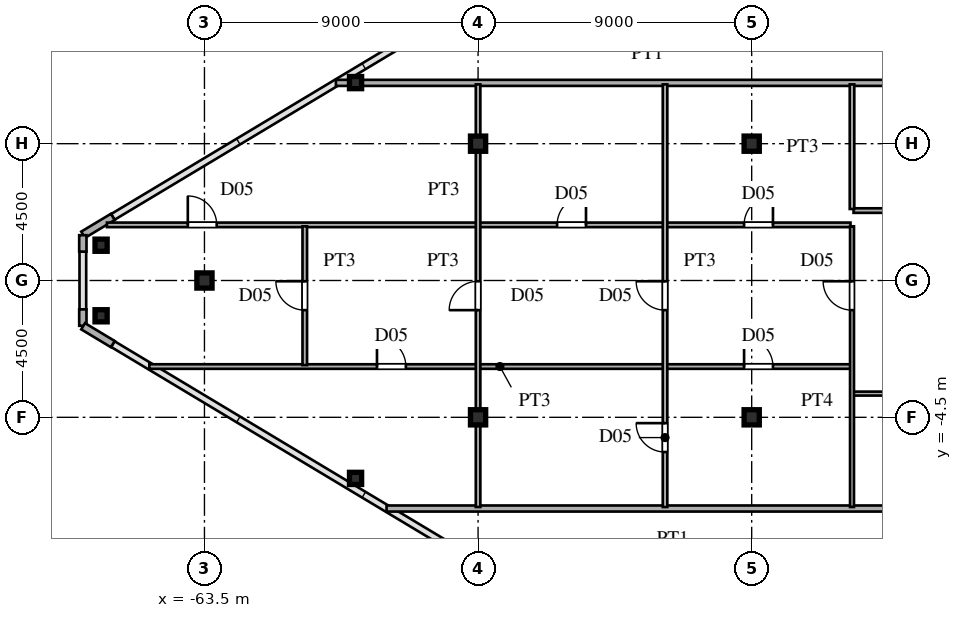
"""IFC4 building model, lengths in metres.
Left out: names, types, materials, properties, quantities, classifications, styles, units other than length and angle.
Written with IfcOpenShell. Run it as: python <this file> out.ifc"""

import sys

from ifc_helpers import new_model, si_unit, direction, frame, frame_2d, origin, origin_2d, place, context, subcontext, project, spatial, rectangle, hollow_rectangle, i_section, extrude, source, transform, mapped, element, fill, save


model = new_model("IFC4")
c1 = context("Model", 3, precision=1e-05, world=origin(), true_north=direction((0.0, 1.0)))
c2 = subcontext(c1, "Body", "Model", "MODEL_VIEW")
j1 = project(units=[si_unit("LENGTHUNIT", "METRE"), si_unit("PLANEANGLEUNIT", "RADIAN")], contexts=[c1])
p1 = place(None, origin())
s1 = spatial("IfcSite", under=j1, at=p1, CompositionType="ELEMENT")
p2 = place(p1, origin())
s2 = spatial("IfcBuilding", under=s1, at=p2, CompositionType="ELEMENT")
p3 = place(p2, frame((0.0, 0.0, 229.8)))
s3 = spatial("IfcBuildingStorey", under=s2, at=p3, CompositionType="ELEMENT", Elevation=229.8)
m1 = source(origin(), c2, "Body", "SweptSolid", [
    extrude(i_section(OverallWidth=0.5, OverallDepth=0.5, WebThickness=0.02, FlangeThickness=0.032, at=origin_2d()), origin(), (0.0, 0.0, 1.0), 4.8),
])
for number, where, z_axis, x_axis in (
    (1, (-45.5, -4.5, 0.0), (0.0, 0.0, 1.0), (1.0, 0.0, 0.0)),
    (2, (-45.5, 4.5, 0.0), (0.0, 0.0, 1.0), (1.0, 0.0, 0.0)),
    (3, (-54.5, -4.5, 0.0), (0.0, 0.0, 1.0), (1.0, 0.0, 0.0)),
    (4, (-54.5, 4.5, 0.0), (0.0, 0.0, 1.0), (1.0, 0.0, 0.0)),
    (5, (-63.5, 0.0, 0.0), (0.0, 0.0, 1.0), (1.0, 0.0, 0.0)),
):
    element("IfcColumn", number, at=place(p3, frame(where, z_axis=z_axis, x_axis=x_axis)), inside=s3, PredefinedType="COLUMN", context=c2, shape_type="MappedRepresentation", body=[
        mapped(m1, transform((0.0, 0.0, 0.0), scale=1.0)),
    ])
m2 = source(origin(), c2, "Body", "SweptSolid", [
    extrude(hollow_rectangle(XDim=0.4, YDim=0.4, WallThickness=0.016, at=origin_2d()), origin(), (0.0, 0.0, 1.0), 4.8),
])
for number, where, z_axis, x_axis in (
    (6, (-66.9, 1.16, 0.0), (0.0, 0.0, 1.0), (1.0, 0.0, 0.0)),
    (7, (-66.9, -1.16, 0.0), (0.0, 0.0, 1.0), (1.0, 0.0, 0.0)),
    (8, (-58.53, -6.509, 0.0), (0.0, 0.0, 1.0), (1.0, 0.0, 0.0)),
    (9, (-58.53, 6.509, 0.0), (0.0, 0.0, 1.0), (1.0, 0.0, 0.0)),
):
    element("IfcColumn", number, at=place(p3, frame(where, z_axis=z_axis, x_axis=x_axis)), inside=s3, PredefinedType="COLUMN", context=c2, shape_type="MappedRepresentation", body=[
        mapped(m2, transform((0.0, 0.0, 0.0), scale=1.0)),
    ])
p4 = place(p3, frame((-66.514, 2.092, 0.0), z_axis=(0.0, 0.0, 1.0), x_axis=(-0.85743623509, -0.514590228002, 0.0)))
e10 = element("IfcWall", 10, at=p4, inside=s3, PredefinedType="SOLIDWALL", context=c2, shape_type="SweptSolid", body=[
    extrude(rectangle(XDim=1.14, YDim=0.24, at=frame_2d((0.57, 0.0))), origin(), (0.0, 0.0, 1.0), 4.54),
])
for number, where, z_axis, x_axis in (
    (11, (-67.5, 1.49, 0.0), (0.0, 0.0, 1.0), (0.0, -1.0, 0.0)),
    (12, (-67.5, -0.95, 0.0), (0.0, 0.0, 1.0), (0.0, -1.0, 0.0)),
):
    element("IfcWall", number, at=place(p3, frame(where, z_axis=z_axis, x_axis=x_axis)), inside=s3, PredefinedType="SOLIDWALL", context=c2, shape_type="SweptSolid", body=[
        extrude(rectangle(XDim=0.54, YDim=0.24, at=frame_2d((0.27, 0.0))), origin(), (0.0, 0.0, 1.0), 4.54),
    ])
p5 = place(p3, frame((-67.491, -1.505, 0.0), z_axis=(0.0, 0.0, 1.0), x_axis=(0.85743623509, -0.514590228002, 0.0)))
e13 = element("IfcWall", 13, at=p5, inside=s3, PredefinedType="SOLIDWALL", context=c2, shape_type="SweptSolid", body=[
    extrude(rectangle(XDim=1.14, YDim=0.24, at=frame_2d((0.57, 0.0))), origin(), (0.0, 0.0, 1.0), 4.54),
])
p6 = place(p3, frame((-57.51, -7.5, 0.0), z_axis=(0.0, 0.0, 1.0), x_axis=(1.0, 0.0, 0.0)))
e14 = element("IfcWall", 14, at=p6, inside=s3, PredefinedType="PARTITIONING", context=c2, shape_type="SweptSolid", body=[
    extrude(rectangle(XDim=18.83, YDim=0.2, at=frame_2d((9.415, 0.0))), origin(), (0.0, 0.0, 1.0), 4.54),
])
p7 = place(p3, frame((-42.15, -3.72, 0.0), z_axis=(0.0, 0.0, 1.0), x_axis=(1.0, 0.0, 0.0)))
e15 = element("IfcWall", 15, at=p7, inside=s3, PredefinedType="PARTITIONING", context=c2, shape_type="SweptSolid", body=[
    extrude(rectangle(XDim=3.5, YDim=0.13, at=frame_2d((1.75, 0.0))), origin(), (0.0, 0.0, 1.0), 4.54),
])
p8 = place(p7, frame((1.31, 0.0, 0.0)))
e16 = element("IfcOpeningElement", 16, at=p8, cuts=e15, PredefinedType="OPENING", context=c2, shape_type="SweptSolid", body=[
    extrude(rectangle(XDim=0.88, YDim=2.1, at=frame_2d((0.44, 1.05))), frame((0.0, 0.075, 0.0), z_axis=(0.0, -1.0, 0.0), x_axis=(1.0, 0.0, 0.0)), (0.0, 0.0, 1.0), 0.15),
])
p9 = place(p3, frame((-65.313, -2.83, 0.0), z_axis=(0.0, 0.0, 1.0), x_axis=(1.0, 0.0, 0.0)))
e17 = element("IfcWall", 17, at=p9, inside=s3, PredefinedType="PARTITIONING", context=c2, shape_type="SweptSolid", body=[
    extrude(rectangle(XDim=23.063, YDim=0.15, at=frame_2d((11.531, 0.0))), origin(), (0.0, 0.0, 1.0), 4.54),
])
p10 = place(p9, frame((19.563, 0.0, 0.0)))
e18 = element("IfcOpeningElement", 18, at=p10, cuts=e17, PredefinedType="OPENING", context=c2, shape_type="SweptSolid", body=[
    extrude(rectangle(XDim=0.95, YDim=2.15, at=frame_2d((0.475, 1.075))), frame((0.0, 0.085, 0.0), z_axis=(0.0, -1.0, 0.0), x_axis=(1.0, 0.0, 0.0)), (0.0, 0.0, 1.0), 0.17),
])
p11 = place(p9, frame((7.488, 0.0, 0.0)))
e19 = element("IfcOpeningElement", 19, at=p11, cuts=e17, PredefinedType="OPENING", context=c2, shape_type="SweptSolid", body=[
    extrude(rectangle(XDim=0.95, YDim=2.15, at=frame_2d((0.475, 1.075))), frame((0.0, 0.085, 0.0), z_axis=(0.0, -1.0, 0.0), x_axis=(1.0, 0.0, 0.0)), (0.0, 0.0, 1.0), 0.17),
])
p12 = place(p3, frame((-66.707, 1.83, 0.0), z_axis=(0.0, 0.0, 1.0), x_axis=(1.0, 0.0, 0.0)))
e20 = element("IfcWall", 20, at=p12, inside=s3, PredefinedType="PARTITIONING", context=c2, shape_type="SweptSolid", body=[
    extrude(rectangle(XDim=24.457, YDim=0.15, at=frame_2d((12.229, 0.0))), origin(), (0.0, 0.0, 1.0), 4.54),
])
p13 = place(p12, frame((20.957, 0.0, 0.0)))
e21 = element("IfcOpeningElement", 21, at=p13, cuts=e20, PredefinedType="OPENING", context=c2, shape_type="SweptSolid", body=[
    extrude(rectangle(XDim=0.95, YDim=2.15, at=frame_2d((0.475, 1.075))), frame((0.0, 0.085, 0.0), z_axis=(0.0, -1.0, 0.0), x_axis=(1.0, 0.0, 0.0)), (0.0, 0.0, 1.0), 0.17),
])
p14 = place(p12, frame((2.66, 0.0, 0.0)))
e22 = element("IfcOpeningElement", 22, at=p14, cuts=e20, PredefinedType="OPENING", context=c2, shape_type="SweptSolid", body=[
    extrude(rectangle(XDim=0.95, YDim=2.15, at=frame_2d((0.475, 1.075))), frame((0.0, 0.085, 0.0), z_axis=(0.0, -1.0, 0.0), x_axis=(1.0, 0.0, 0.0)), (0.0, 0.0, 1.0), 0.17),
])
p15 = place(p12, frame((14.807, 0.0, 0.0)))
e23 = element("IfcOpeningElement", 23, at=p15, cuts=e20, PredefinedType="OPENING", context=c2, shape_type="SweptSolid", body=[
    extrude(rectangle(XDim=0.95, YDim=2.15, at=frame_2d((0.475, 1.075))), frame((0.0, 0.085, 0.0), z_axis=(0.0, -1.0, 0.0), x_axis=(1.0, 0.0, 0.0)), (0.0, 0.0, 1.0), 0.17),
])
p16 = place(p3, frame((-42.15, 2.3, 0.0), z_axis=(0.0, 0.0, 1.0), x_axis=(1.0, 0.0, 0.0)))
e24 = element("IfcWall", 24, at=p16, inside=s3, PredefinedType="PARTITIONING", context=c2, shape_type="SweptSolid", body=[
    extrude(rectangle(XDim=3.5, YDim=0.15, at=frame_2d((1.75, 0.0))), origin(), (0.0, 0.0, 1.0), 4.54),
])
p17 = place(p16, frame((1.275, 0.0, 0.0)))
e25 = element("IfcOpeningElement", 25, at=p17, cuts=e24, PredefinedType="OPENING", context=c2, shape_type="SweptSolid", body=[
    extrude(rectangle(XDim=0.95, YDim=2.15, at=frame_2d((0.475, 1.075))), frame((0.0, 0.085, 0.0), z_axis=(0.0, -1.0, 0.0), x_axis=(1.0, 0.0, 0.0)), (0.0, 0.0, 1.0), 0.17),
])
p18 = place(p3, frame((-59.176, 6.5, 0.0), z_axis=(0.0, 0.0, 1.0), x_axis=(1.0, 0.0, 0.0)))
e26 = element("IfcWall", 26, at=p18, inside=s3, PredefinedType="PARTITIONING", context=c2, shape_type="SweptSolid", body=[
    extrude(rectangle(XDim=20.496, YDim=0.2, at=frame_2d((10.248, 0.0))), origin(), (0.0, 0.0, 1.0), 4.54),
])
p19 = place(p3, frame((-60.2, -2.783, 0.0), z_axis=(0.0, 0.0, 1.0), x_axis=(0.0, 1.0, 0.0)))
e27 = element("IfcWall", 27, at=p19, inside=s3, PredefinedType="PARTITIONING", context=c2, shape_type="SweptSolid", body=[
    extrude(rectangle(XDim=4.566, YDim=0.15, at=frame_2d((2.283, 0.0))), origin(), (0.0, 0.0, 1.0), 4.54),
])
p20 = place(p19, frame((1.808, 0.0, 0.0)))
e28 = element("IfcOpeningElement", 28, at=p20, cuts=e27, PredefinedType="OPENING", context=c2, shape_type="SweptSolid", body=[
    extrude(rectangle(XDim=0.95, YDim=2.15, at=frame_2d((0.475, 1.075))), frame((0.0, 0.085, 0.0), z_axis=(0.0, -1.0, 0.0), x_axis=(1.0, 0.0, 0.0)), (0.0, 0.0, 1.0), 0.17),
])
p21 = place(p3, frame((-54.5, -7.45, 0.0), z_axis=(0.0, 0.0, 1.0), x_axis=(0.0, 1.0, 0.0)))
e29 = element("IfcWall", 29, at=p21, inside=s3, PredefinedType="PARTITIONING", context=c2, shape_type="SweptSolid", body=[
    extrude(rectangle(XDim=13.9, YDim=0.15, at=frame_2d((6.95, 0.0))), origin(), (0.0, 0.0, 1.0), 3.94),
])
p22 = place(p21, frame((6.475, 0.0, 0.0)))
e30 = element("IfcOpeningElement", 30, at=p22, cuts=e29, PredefinedType="OPENING", context=c2, shape_type="SweptSolid", body=[
    extrude(rectangle(XDim=0.95, YDim=2.15, at=frame_2d((0.475, 1.075))), frame((0.0, 0.085, 0.0), z_axis=(0.0, -1.0, 0.0), x_axis=(1.0, 0.0, 0.0)), (0.0, 0.0, 1.0), 0.17),
])
p23 = place(p3, frame((-48.35, -7.45, 0.0), z_axis=(0.0, 0.0, 1.0), x_axis=(0.0, 1.0, 0.0)))
e31 = element("IfcWall", 31, at=p23, inside=s3, PredefinedType="PARTITIONING", context=c2, shape_type="SweptSolid", body=[
    extrude(rectangle(XDim=13.9, YDim=0.15, at=frame_2d((6.95, 0.0))), origin(), (0.0, 0.0, 1.0), 4.54),
])
p24 = place(p23, frame((6.475, 0.0, 0.0)))
e32 = element("IfcOpeningElement", 32, at=p24, cuts=e31, PredefinedType="OPENING", context=c2, shape_type="SweptSolid", body=[
    extrude(rectangle(XDim=0.95, YDim=2.15, at=frame_2d((0.475, 1.075))), frame((0.0, 0.085, 0.0), z_axis=(0.0, -1.0, 0.0), x_axis=(1.0, 0.0, 0.0)), (0.0, 0.0, 1.0), 0.17),
])
p25 = place(p23, frame((1.808, 0.0, 0.0)))
e33 = element("IfcOpeningElement", 33, at=p25, cuts=e31, PredefinedType="OPENING", context=c2, shape_type="SweptSolid", body=[
    extrude(rectangle(XDim=0.95, YDim=2.15, at=frame_2d((0.475, 1.075))), frame((0.0, 0.085, 0.0), z_axis=(0.0, -1.0, 0.0), x_axis=(1.0, 0.0, 0.0)), (0.0, 0.0, 1.0), 0.17),
])
p26 = place(p3, frame((-42.2, -7.45, 0.0), z_axis=(0.0, 0.0, 1.0), x_axis=(0.0, 1.0, 0.0)))
e34 = element("IfcWall", 34, at=p26, inside=s3, PredefinedType="PARTITIONING", context=c2, shape_type="SweptSolid", body=[
    extrude(rectangle(XDim=9.233, YDim=0.13, at=frame_2d((4.616, 0.0))), origin(), (0.0, 0.0, 1.0), 4.54),
])
p27 = place(p26, frame((6.475, 0.0, 0.0)))
e35 = element("IfcOpeningElement", 35, at=p27, cuts=e34, PredefinedType="OPENING", context=c2, shape_type="SweptSolid", body=[
    extrude(rectangle(XDim=0.95, YDim=2.15, at=frame_2d((0.475, 1.075))), frame((0.0, 0.075, 0.0), z_axis=(0.0, -1.0, 0.0), x_axis=(1.0, 0.0, 0.0)), (0.0, 0.0, 1.0), 0.15),
])
p28 = place(p3, frame((-42.2, 2.352, 0.0), z_axis=(0.0, 0.0, 1.0), x_axis=(0.0, 1.0, 0.0)))
e36 = element("IfcWall", 36, at=p28, inside=s3, PredefinedType="PARTITIONING", context=c2, shape_type="SweptSolid", body=[
    extrude(rectangle(XDim=4.098, YDim=0.15, at=frame_2d((2.049, 0.0))), origin(), (0.0, 0.0, 1.0), 4.54),
])
m3 = source(origin(), c2, "Body", "SweptSolid", [
    extrude(rectangle(XDim=0.95, YDim=2.15, at=frame_2d((0.475, 1.075))), frame((0.0, 0.025, 0.0), z_axis=(0.0, -1.0, 0.0), x_axis=(1.0, 0.0, 0.0)), (0.0, 0.0, 1.0), 0.05),
])
p29 = place(p10, origin())
e37 = element("IfcDoor", 37, at=p29, inside=s3, OperationType="SINGLE_SWING_LEFT", PredefinedType="DOOR", context=c2, shape_type="MappedRepresentation", body=[
    mapped(m3, transform((0.0, 0.0, 0.0), scale=1.0)),
])
fill(e18, e37)
p30 = place(p11, origin())
e38 = element("IfcDoor", 38, at=p30, inside=s3, OperationType="SINGLE_SWING_LEFT", PredefinedType="DOOR", context=c2, shape_type="MappedRepresentation", body=[
    mapped(m3, transform((0.0, 0.0, 0.0), scale=1.0)),
])
fill(e19, e38)
p31 = place(p13, origin())
e39 = element("IfcDoor", 39, at=p31, inside=s3, OperationType="SINGLE_SWING_RIGHT", PredefinedType="DOOR", context=c2, shape_type="MappedRepresentation", body=[
    mapped(m3, transform((0.0, 0.0, 0.0), scale=1.0)),
])
fill(e21, e39)
p32 = place(p14, origin())
e40 = element("IfcDoor", 40, at=p32, inside=s3, OperationType="SINGLE_SWING_LEFT", PredefinedType="DOOR", context=c2, shape_type="MappedRepresentation", body=[
    mapped(m3, transform((0.0, 0.0, 0.0), scale=1.0)),
])
fill(e22, e40)
p33 = place(p15, origin())
e41 = element("IfcDoor", 41, at=p33, inside=s3, OperationType="SINGLE_SWING_RIGHT", PredefinedType="DOOR", context=c2, shape_type="MappedRepresentation", body=[
    mapped(m3, transform((0.0, 0.0, 0.0), scale=1.0)),
])
fill(e23, e41)
p34 = place(p20, origin())
e42 = element("IfcDoor", 42, at=p34, inside=s3, OperationType="SINGLE_SWING_RIGHT", PredefinedType="DOOR", context=c2, shape_type="MappedRepresentation", body=[
    mapped(m3, transform((0.0, 0.0, 0.0), scale=1.0)),
])
fill(e28, e42)
p35 = place(p22, origin())
e43 = element("IfcDoor", 43, at=p35, inside=s3, OperationType="SINGLE_SWING_LEFT", PredefinedType="DOOR", context=c2, shape_type="MappedRepresentation", body=[
    mapped(m3, transform((0.0, 0.0, 0.0), scale=1.0)),
])
fill(e30, e43)
p36 = place(p24, origin())
e44 = element("IfcDoor", 44, at=p36, inside=s3, OperationType="SINGLE_SWING_RIGHT", PredefinedType="DOOR", context=c2, shape_type="MappedRepresentation", body=[
    mapped(m3, transform((0.0, 0.0, 0.0), scale=1.0)),
])
fill(e32, e44)
p37 = place(p25, origin())
e45 = element("IfcDoor", 45, at=p37, inside=s3, OperationType="SINGLE_SWING_RIGHT", PredefinedType="DOOR", context=c2, shape_type="MappedRepresentation", body=[
    mapped(m3, transform((0.0, 0.0, 0.0), scale=1.0)),
])
fill(e33, e45)
p38 = place(p27, origin())
e46 = element("IfcDoor", 46, at=p38, inside=s3, OperationType="SINGLE_SWING_RIGHT", PredefinedType="DOOR", context=c2, shape_type="MappedRepresentation", body=[
    mapped(m3, transform((0.0, 0.0, 0.0), scale=1.0)),
])
fill(e35, e46)
save(model, sys.argv[1])
